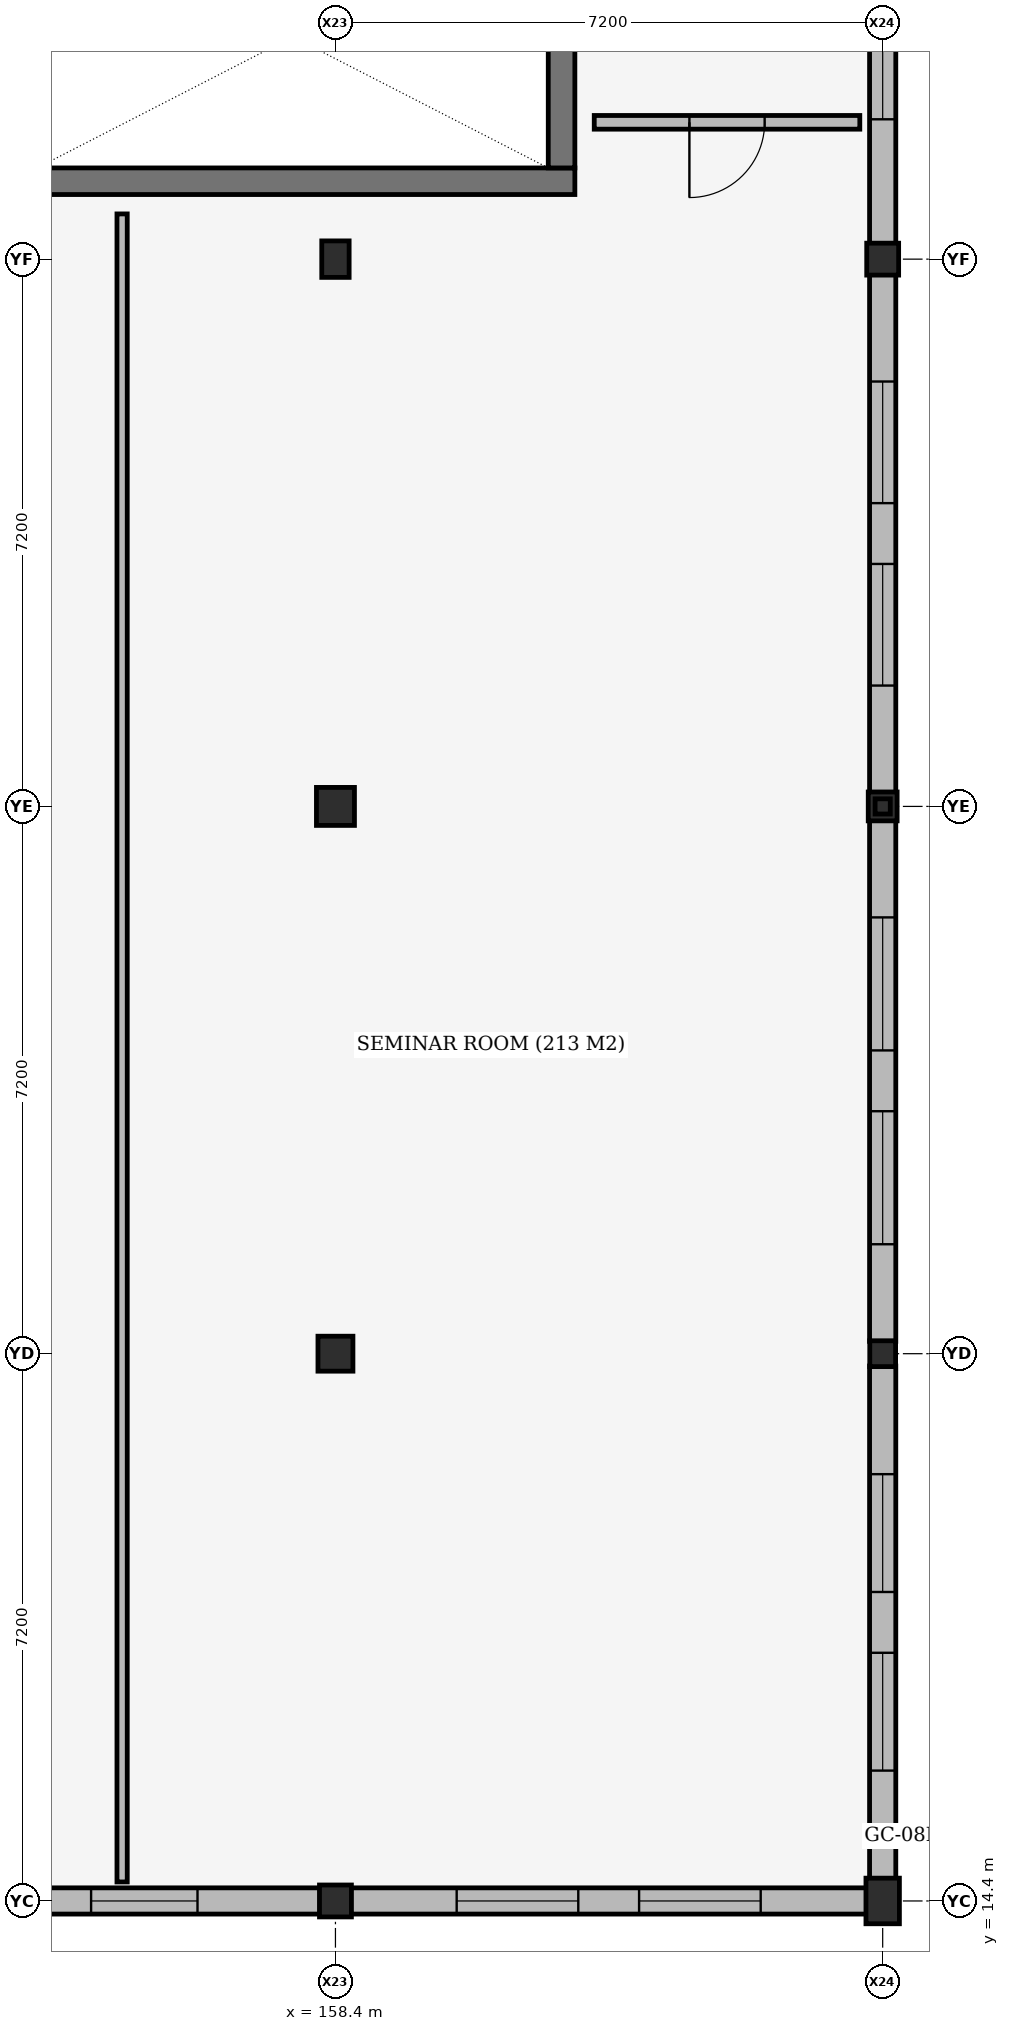
"""IFC4 building model, lengths in metres.
Left out: names, types, materials, properties, quantities, classifications, styles, units other than length and angle.
Written with IfcOpenShell. Run it as: python <this file> out.ifc"""

import sys

from ifc_helpers import new_model, si_unit, direction, frame, frame_2d, origin, origin_2d, place, context, subcontext, project, spatial, rectangle, i_section, extrude, element, fill, save


model = new_model("IFC4")
c1 = context("Model", 3, precision=1e-05, world=origin(), true_north=direction((0.0, 1.0)))
c2 = subcontext(c1, "Body", "Model", "MODEL_VIEW")
j1 = project(units=[si_unit("LENGTHUNIT", "METRE"), si_unit("PLANEANGLEUNIT", "RADIAN")], contexts=[c1])
p1 = place(None, origin())
s1 = spatial("IfcSite", under=j1, at=p1, CompositionType="ELEMENT")
p2 = place(p1, origin())
s2 = spatial("IfcBuilding", under=s1, at=p2, CompositionType="ELEMENT")
p3 = place(p2, frame((0.0, 0.0, 13.8)))
s3 = spatial("IfcBuildingStorey", under=s2, at=p3, CompositionType="ELEMENT", Elevation=13.8)
p4 = place(p3, frame((158.4, 14.4, 0.0), z_axis=(0.0, 0.0, 1.0), x_axis=(1.0, 0.0, 0.0)))
e1 = element("IfcColumn", 1, at=p4, inside=s3, PredefinedType="COLUMN", context=c2, shape_type="SweptSolid", body=[
    extrude(rectangle(XDim=0.42, YDim=0.42, at=origin_2d()), origin(), (0.0, 0.0, 1.0), 3.96),
])
p5 = place(p3, frame((158.4, 21.6, 0.0), z_axis=(0.0, 0.0, 1.0), x_axis=(1.0, 0.0, 0.0)))
e2 = element("IfcColumn", 2, at=p5, inside=s3, PredefinedType="COLUMN", context=c2, shape_type="SweptSolid", body=[
    extrude(rectangle(XDim=0.46, YDim=0.46, at=origin_2d()), origin(), (0.0, 0.0, 1.0), 3.96),
])
p6 = place(p3, frame((158.4, 28.8, 0.0), z_axis=(0.0, 0.0, 1.0), x_axis=(1.0, 0.0, 0.0)))
e3 = element("IfcColumn", 3, at=p6, inside=s3, PredefinedType="COLUMN", context=c2, shape_type="SweptSolid", body=[
    extrude(rectangle(XDim=0.5, YDim=0.5, at=origin_2d()), origin(), (0.0, 0.0, 1.0), 3.96),
])
p7 = place(p3, frame((158.4, 36.0, 0.0), z_axis=(0.0, 0.0, 1.0), x_axis=(1.0, 0.0, 0.0)))
e4 = element("IfcColumn", 4, at=p7, inside=s3, PredefinedType="COLUMN", context=c2, shape_type="SweptSolid", body=[
    extrude(rectangle(XDim=0.36, YDim=0.48, at=origin_2d()), origin(), (0.0, 0.0, 1.0), 3.96),
])
p8 = place(p3, frame((165.6, 14.4, 0.0), z_axis=(0.0, 0.0, 1.0), x_axis=(1.0, 0.0, 0.0)))
e5 = element("IfcColumn", 5, at=p8, inside=s3, PredefinedType="COLUMN", context=c2, shape_type="SweptSolid", body=[
    extrude(rectangle(XDim=0.44, YDim=0.6, at=origin_2d()), origin(), (0.0, 0.0, 1.0), 3.96),
])
p9 = place(p3, frame((165.6, 21.6, 0.0), z_axis=(0.0, 0.0, 1.0), x_axis=(1.0, 0.0, 0.0)))
e6 = element("IfcColumn", 6, at=p9, inside=s3, PredefinedType="COLUMN", context=c2, shape_type="SweptSolid", body=[
    extrude(rectangle(XDim=0.34, YDim=0.34, at=origin_2d()), origin(), (0.0, 0.0, 1.0), 3.96),
])
p10 = place(p3, frame((165.6, 28.8, 0.0), z_axis=(0.0, 0.0, 1.0), x_axis=(1.0, 0.0, 0.0)))
e7 = element("IfcColumn", 7, at=p10, inside=s3, PredefinedType="COLUMN", context=c2, shape_type="SweptSolid", body=[
    extrude(rectangle(XDim=0.38, YDim=0.38, at=origin_2d()), origin(), (0.0, 0.0, 1.0), 3.96),
])
p11 = place(p3, frame((165.6, 36.0, 0.0), z_axis=(0.0, 0.0, 1.0), x_axis=(1.0, 0.0, 0.0)))
e8 = element("IfcColumn", 8, at=p11, inside=s3, PredefinedType="COLUMN", context=c2, shape_type="SweptSolid", body=[
    extrude(rectangle(XDim=0.42, YDim=0.42, at=origin_2d()), origin(), (0.0, 0.0, 1.0), 3.96),
])
p12 = place(p3, frame((152.45, 37.025, 0.0), z_axis=(0.0, 0.0, 1.0), x_axis=(1.0, 0.0, 0.0)))
e9 = element("IfcWall", 9, at=p12, inside=s3, PredefinedType="SHEAR", context=c2, shape_type="SweptSolid", body=[
    extrude(rectangle(XDim=9.1, YDim=0.35, at=frame_2d((4.55, 0.0))), origin(), (0.0, 0.0, 1.0), 3.96),
])
p13 = place(p3, frame((161.375, 37.2, 0.0), z_axis=(0.0, 0.0, 1.0), x_axis=(0.0, 1.0, 0.0)))
e10 = element("IfcWall", 10, at=p13, inside=s3, PredefinedType="SHEAR", context=c2, shape_type="SweptSolid", body=[
    extrude(rectangle(XDim=3.45, YDim=0.35, at=frame_2d((1.725, 0.0))), origin(), (0.0, 0.0, 1.0), 3.96),
])
p14 = place(p3, frame((165.6, 28.8, 3.96), z_axis=(0.0, 0.0, 1.0), x_axis=(1.0, 0.0, 0.0)))
e11 = element("IfcColumn", 11, at=p14, inside=s3, PredefinedType="COLUMN", context=c2, shape_type="SweptSolid", body=[
    extrude(i_section(OverallWidth=0.2, OverallDepth=0.2, WebThickness=0.009, FlangeThickness=0.015, FilletRadius=0.018, at=origin_2d()), origin(), (0.0, 0.0, 1.0), 2.655),
])
p15 = place(p3, frame((158.198, 14.4, 0.0), z_axis=(0.0, 0.0, 1.0), x_axis=(-1.0, 0.0, 0.0)))
e12 = element("IfcWall", 12, at=p15, inside=s3, PredefinedType="STANDARD", context=c2, shape_type="SweptSolid", body=[
    extrude(rectangle(XDim=6.826, YDim=0.345, at=frame_2d((3.413, 0.0))), origin(), (0.0, 0.0, 1.0), 3.96),
])
p16 = place(p15, frame((1.613, 0.0, 0.8)))
e13 = element("IfcOpeningElement", 13, at=p16, cuts=e12, PredefinedType="OPENING", context=c2, shape_type="SweptSolid", body=[
    extrude(rectangle(XDim=1.4, YDim=2.6, at=frame_2d((0.7, 1.3))), frame((0.0, 0.182, 0.0), z_axis=(0.0, -1.0, 0.0), x_axis=(1.0, 0.0, 0.0)), (0.0, 0.0, 1.0), 0.365),
])
p17 = place(p15, frame((3.813, 0.0, 0.8)))
e14 = element("IfcOpeningElement", 14, at=p17, cuts=e12, PredefinedType="OPENING", context=c2, shape_type="SweptSolid", body=[
    extrude(rectangle(XDim=1.4, YDim=2.6, at=frame_2d((0.7, 1.3))), frame((0.0, 0.182, 0.0), z_axis=(0.0, -1.0, 0.0), x_axis=(1.0, 0.0, 0.0)), (0.0, 0.0, 1.0), 0.365),
])
p18 = place(p3, frame((165.388, 14.4, 0.0), z_axis=(0.0, 0.0, 1.0), x_axis=(-1.0, 0.0, 0.0)))
e15 = element("IfcWall", 15, at=p18, inside=s3, PredefinedType="STANDARD", context=c2, shape_type="SweptSolid", body=[
    extrude(rectangle(XDim=6.786, YDim=0.345, at=frame_2d((3.393, 0.0))), origin(), (0.0, 0.0, 1.0), 3.96),
])
p19 = place(p18, frame((1.393, 0.0, 0.8)))
e16 = element("IfcOpeningElement", 16, at=p19, cuts=e15, PredefinedType="OPENING", context=c2, shape_type="SweptSolid", body=[
    extrude(rectangle(XDim=1.6, YDim=2.6, at=frame_2d((0.8, 1.3))), frame((0.0, 0.182, 0.0), z_axis=(0.0, -1.0, 0.0), x_axis=(1.0, 0.0, 0.0)), (0.0, 0.0, 1.0), 0.365),
])
p20 = place(p18, frame((3.793, 0.0, 0.8)))
e17 = element("IfcOpeningElement", 17, at=p20, cuts=e15, PredefinedType="OPENING", context=c2, shape_type="SweptSolid", body=[
    extrude(rectangle(XDim=1.6, YDim=2.6, at=frame_2d((0.8, 1.3))), frame((0.0, 0.182, 0.0), z_axis=(0.0, -1.0, 0.0), x_axis=(1.0, 0.0, 0.0)), (0.0, 0.0, 1.0), 0.365),
])
p21 = place(p3, frame((165.6, 21.438, 0.0), z_axis=(0.0, 0.0, 1.0), x_axis=(0.0, -1.0, 0.0)))
e18 = element("IfcWall", 18, at=p21, inside=s3, PredefinedType="STANDARD", context=c2, shape_type="SweptSolid", body=[
    extrude(rectangle(XDim=6.746, YDim=0.345, at=frame_2d((3.373, 0.0))), origin(), (0.0, 0.0, 1.0), 3.96),
])
p22 = place(p21, frame((1.423, 0.0, 0.85)))
e19 = element("IfcOpeningElement", 19, at=p22, cuts=e18, PredefinedType="OPENING", context=c2, shape_type="SweptSolid", body=[
    extrude(rectangle(XDim=1.55, YDim=2.45, at=frame_2d((0.775, 1.225))), frame((0.0, 0.182, 0.0), z_axis=(0.0, -1.0, 0.0), x_axis=(1.0, 0.0, 0.0)), (0.0, 0.0, 1.0), 0.365),
])
p23 = place(p21, frame((3.773, 0.0, 0.85)))
e20 = element("IfcOpeningElement", 20, at=p23, cuts=e18, PredefinedType="OPENING", context=c2, shape_type="SweptSolid", body=[
    extrude(rectangle(XDim=1.55, YDim=2.45, at=frame_2d((0.775, 1.225))), frame((0.0, 0.182, 0.0), z_axis=(0.0, -1.0, 0.0), x_axis=(1.0, 0.0, 0.0)), (0.0, 0.0, 1.0), 0.365),
])
p24 = place(p3, frame((165.6, 28.618, 0.0), z_axis=(0.0, 0.0, 1.0), x_axis=(0.0, -1.0, 0.0)))
e21 = element("IfcWall", 21, at=p24, inside=s3, PredefinedType="STANDARD", context=c2, shape_type="SweptSolid", body=[
    extrude(rectangle(XDim=6.856, YDim=0.345, at=frame_2d((3.428, 0.0))), origin(), (0.0, 0.0, 1.0), 3.96),
])
p25 = place(p24, frame((1.278, 0.0, 0.85)))
e22 = element("IfcOpeningElement", 22, at=p25, cuts=e21, PredefinedType="OPENING", context=c2, shape_type="SweptSolid", body=[
    extrude(rectangle(XDim=1.75, YDim=2.45, at=frame_2d((0.875, 1.225))), frame((0.0, 0.182, 0.0), z_axis=(0.0, -1.0, 0.0), x_axis=(1.0, 0.0, 0.0)), (0.0, 0.0, 1.0), 0.365),
])
p26 = place(p24, frame((3.828, 0.0, 0.85)))
e23 = element("IfcOpeningElement", 23, at=p26, cuts=e21, PredefinedType="OPENING", context=c2, shape_type="SweptSolid", body=[
    extrude(rectangle(XDim=1.75, YDim=2.45, at=frame_2d((0.875, 1.225))), frame((0.0, 0.182, 0.0), z_axis=(0.0, -1.0, 0.0), x_axis=(1.0, 0.0, 0.0)), (0.0, 0.0, 1.0), 0.365),
])
p27 = place(p3, frame((165.6, 35.798, 0.0), z_axis=(0.0, 0.0, 1.0), x_axis=(0.0, -1.0, 0.0)))
e24 = element("IfcWall", 24, at=p27, inside=s3, PredefinedType="STANDARD", context=c2, shape_type="SweptSolid", body=[
    extrude(rectangle(XDim=6.816, YDim=0.345, at=frame_2d((3.408, 0.0))), origin(), (0.0, 0.0, 1.0), 3.96),
])
p28 = place(p27, frame((1.408, 0.0, 0.8)))
e25 = element("IfcOpeningElement", 25, at=p28, cuts=e24, PredefinedType="OPENING", context=c2, shape_type="SweptSolid", body=[
    extrude(rectangle(XDim=1.6, YDim=2.6, at=frame_2d((0.8, 1.3))), frame((0.0, 0.182, 0.0), z_axis=(0.0, -1.0, 0.0), x_axis=(1.0, 0.0, 0.0)), (0.0, 0.0, 1.0), 0.365),
])
p29 = place(p27, frame((3.808, 0.0, 0.8)))
e26 = element("IfcOpeningElement", 26, at=p29, cuts=e24, PredefinedType="OPENING", context=c2, shape_type="SweptSolid", body=[
    extrude(rectangle(XDim=1.6, YDim=2.6, at=frame_2d((0.8, 1.3))), frame((0.0, 0.182, 0.0), z_axis=(0.0, -1.0, 0.0), x_axis=(1.0, 0.0, 0.0)), (0.0, 0.0, 1.0), 0.365),
])
p30 = place(p3, frame((165.6, 42.978, 0.0), z_axis=(0.0, 0.0, 1.0), x_axis=(0.0, -1.0, 0.0)))
e27 = element("IfcWall", 27, at=p30, inside=s3, PredefinedType="STANDARD", context=c2, shape_type="SweptSolid", body=[
    extrude(rectangle(XDim=6.776, YDim=0.345, at=frame_2d((3.388, 0.0))), origin(), (0.0, 0.0, 1.0), 3.96),
])
p31 = place(p30, frame((1.638, 0.0, 0.95)))
e28 = element("IfcOpeningElement", 28, at=p31, cuts=e27, PredefinedType="OPENING", context=c2, shape_type="SweptSolid", body=[
    extrude(rectangle(XDim=1.35, YDim=2.0, at=frame_2d((0.675, 1.0))), frame((0.0, 0.182, 0.0), z_axis=(0.0, -1.0, 0.0), x_axis=(1.0, 0.0, 0.0)), (0.0, 0.0, 1.0), 0.365),
])
p32 = place(p30, frame((3.788, 0.0, 0.95)))
e29 = element("IfcOpeningElement", 29, at=p32, cuts=e27, PredefinedType="OPENING", context=c2, shape_type="SweptSolid", body=[
    extrude(rectangle(XDim=1.35, YDim=2.0, at=frame_2d((0.675, 1.0))), frame((0.0, 0.182, 0.0), z_axis=(0.0, -1.0, 0.0), x_axis=(1.0, 0.0, 0.0)), (0.0, 0.0, 1.0), 0.365),
])
p33 = place(p3, frame((155.593, 14.65, 0.0), z_axis=(0.0, 0.0, 1.0), x_axis=(0.0, 1.0, 0.0)))
e30 = element("IfcWall", 30, at=p33, inside=s3, PredefinedType="PARTITIONING", context=c2, shape_type="SweptSolid", body=[
    extrude(rectangle(XDim=21.945, YDim=0.135, at=frame_2d((10.973, 0.0))), origin(), (0.0, 0.0, 1.0), 3.96),
])
p34 = place(p3, frame((161.805, 37.8, 0.0), z_axis=(0.0, 0.0, 1.0), x_axis=(1.0, 0.0, 0.0)))
e31 = element("IfcWall", 31, at=p34, inside=s3, PredefinedType="PARTITIONING", context=c2, shape_type="SweptSolid", body=[
    extrude(rectangle(XDim=3.494, YDim=0.18, at=frame_2d((1.747, 0.0))), origin(), (0.0, 0.0, 1.0), 3.96),
])
p35 = place(p34, frame((1.252, 0.0, 0.0)))
e32 = element("IfcOpeningElement", 32, at=p35, cuts=e31, PredefinedType="OPENING", context=c2, shape_type="SweptSolid", body=[
    extrude(rectangle(XDim=0.99, YDim=2.18, at=frame_2d((0.495, 1.09))), frame((0.0, 0.1, 0.0), z_axis=(0.0, -1.0, 0.0), x_axis=(1.0, 0.0, 0.0)), (0.0, 0.0, 1.0), 0.2),
])
p36 = place(p16, origin())
e33 = element("IfcWindow", 33, at=p36, inside=s3, PartitioningType="DOUBLE_PANEL_VERTICAL", PredefinedType="WINDOW", context=c2, shape_type="SweptSolid", body=[
    extrude(rectangle(XDim=1.4, YDim=2.6, at=frame_2d((0.7, 1.3))), frame((0.0, 0.03, 0.0), z_axis=(0.0, -1.0, 0.0), x_axis=(1.0, 0.0, 0.0)), (0.0, 0.0, 1.0), 0.06),
])
fill(e13, e33)
p37 = place(p19, origin())
e34 = element("IfcWindow", 34, at=p37, inside=s3, PartitioningType="DOUBLE_PANEL_VERTICAL", PredefinedType="WINDOW", context=c2, shape_type="SweptSolid", body=[
    extrude(rectangle(XDim=1.6, YDim=2.6, at=frame_2d((0.8, 1.3))), frame((0.0, 0.03, 0.0), z_axis=(0.0, -1.0, 0.0), x_axis=(1.0, 0.0, 0.0)), (0.0, 0.0, 1.0), 0.06),
])
fill(e16, e34)
p38 = place(p20, origin())
e35 = element("IfcWindow", 35, at=p38, inside=s3, PartitioningType="DOUBLE_PANEL_VERTICAL", PredefinedType="WINDOW", context=c2, shape_type="SweptSolid", body=[
    extrude(rectangle(XDim=1.6, YDim=2.6, at=frame_2d((0.8, 1.3))), frame((0.0, 0.03, 0.0), z_axis=(0.0, -1.0, 0.0), x_axis=(1.0, 0.0, 0.0)), (0.0, 0.0, 1.0), 0.06),
])
fill(e17, e35)
p39 = place(p22, origin())
e36 = element("IfcWindow", 36, at=p39, inside=s3, PartitioningType="DOUBLE_PANEL_VERTICAL", PredefinedType="WINDOW", context=c2, shape_type="SweptSolid", body=[
    extrude(rectangle(XDim=1.55, YDim=2.45, at=frame_2d((0.775, 1.225))), frame((0.0, 0.03, 0.0), z_axis=(0.0, -1.0, 0.0), x_axis=(1.0, 0.0, 0.0)), (0.0, 0.0, 1.0), 0.06),
])
fill(e19, e36)
p40 = place(p23, origin())
e37 = element("IfcWindow", 37, at=p40, inside=s3, PartitioningType="DOUBLE_PANEL_VERTICAL", PredefinedType="WINDOW", context=c2, shape_type="SweptSolid", body=[
    extrude(rectangle(XDim=1.55, YDim=2.45, at=frame_2d((0.775, 1.225))), frame((0.0, 0.03, 0.0), z_axis=(0.0, -1.0, 0.0), x_axis=(1.0, 0.0, 0.0)), (0.0, 0.0, 1.0), 0.06),
])
fill(e20, e37)
p41 = place(p25, origin())
e38 = element("IfcWindow", 38, at=p41, inside=s3, PartitioningType="DOUBLE_PANEL_VERTICAL", PredefinedType="WINDOW", context=c2, shape_type="SweptSolid", body=[
    extrude(rectangle(XDim=1.75, YDim=2.45, at=frame_2d((0.875, 1.225))), frame((0.0, 0.03, 0.0), z_axis=(0.0, -1.0, 0.0), x_axis=(1.0, 0.0, 0.0)), (0.0, 0.0, 1.0), 0.06),
])
fill(e22, e38)
p42 = place(p26, origin())
e39 = element("IfcWindow", 39, at=p42, inside=s3, PartitioningType="DOUBLE_PANEL_VERTICAL", PredefinedType="WINDOW", context=c2, shape_type="SweptSolid", body=[
    extrude(rectangle(XDim=1.75, YDim=2.45, at=frame_2d((0.875, 1.225))), frame((0.0, 0.03, 0.0), z_axis=(0.0, -1.0, 0.0), x_axis=(1.0, 0.0, 0.0)), (0.0, 0.0, 1.0), 0.06),
])
fill(e23, e39)
p43 = place(p28, origin())
e40 = element("IfcWindow", 40, at=p43, inside=s3, PartitioningType="DOUBLE_PANEL_VERTICAL", PredefinedType="WINDOW", context=c2, shape_type="SweptSolid", body=[
    extrude(rectangle(XDim=1.6, YDim=2.6, at=frame_2d((0.8, 1.3))), frame((0.0, 0.03, 0.0), z_axis=(0.0, -1.0, 0.0), x_axis=(1.0, 0.0, 0.0)), (0.0, 0.0, 1.0), 0.06),
])
fill(e25, e40)
p44 = place(p29, origin())
e41 = element("IfcWindow", 41, at=p44, inside=s3, PartitioningType="DOUBLE_PANEL_VERTICAL", PredefinedType="WINDOW", context=c2, shape_type="SweptSolid", body=[
    extrude(rectangle(XDim=1.6, YDim=2.6, at=frame_2d((0.8, 1.3))), frame((0.0, 0.03, 0.0), z_axis=(0.0, -1.0, 0.0), x_axis=(1.0, 0.0, 0.0)), (0.0, 0.0, 1.0), 0.06),
])
fill(e26, e41)
p45 = place(p32, origin())
e42 = element("IfcWindow", 42, at=p45, inside=s3, PartitioningType="DOUBLE_PANEL_VERTICAL", PredefinedType="WINDOW", context=c2, shape_type="SweptSolid", body=[
    extrude(rectangle(XDim=1.35, YDim=2.0, at=frame_2d((0.675, 1.0))), frame((0.0, 0.03, 0.0), z_axis=(0.0, -1.0, 0.0), x_axis=(1.0, 0.0, 0.0)), (0.0, 0.0, 1.0), 0.06),
])
fill(e29, e42)
p46 = place(p35, origin())
e43 = element("IfcDoor", 43, at=p46, inside=s3, OperationType="SINGLE_SWING_RIGHT", PredefinedType="DOOR", context=c2, shape_type="SweptSolid", body=[
    extrude(rectangle(XDim=0.99, YDim=2.18, at=frame_2d((0.495, 1.09))), frame((0.0, 0.025, 0.0), z_axis=(0.0, -1.0, 0.0), x_axis=(1.0, 0.0, 0.0)), (0.0, 0.0, 1.0), 0.05),
])
fill(e32, e43)
save(model, sys.argv[1])
